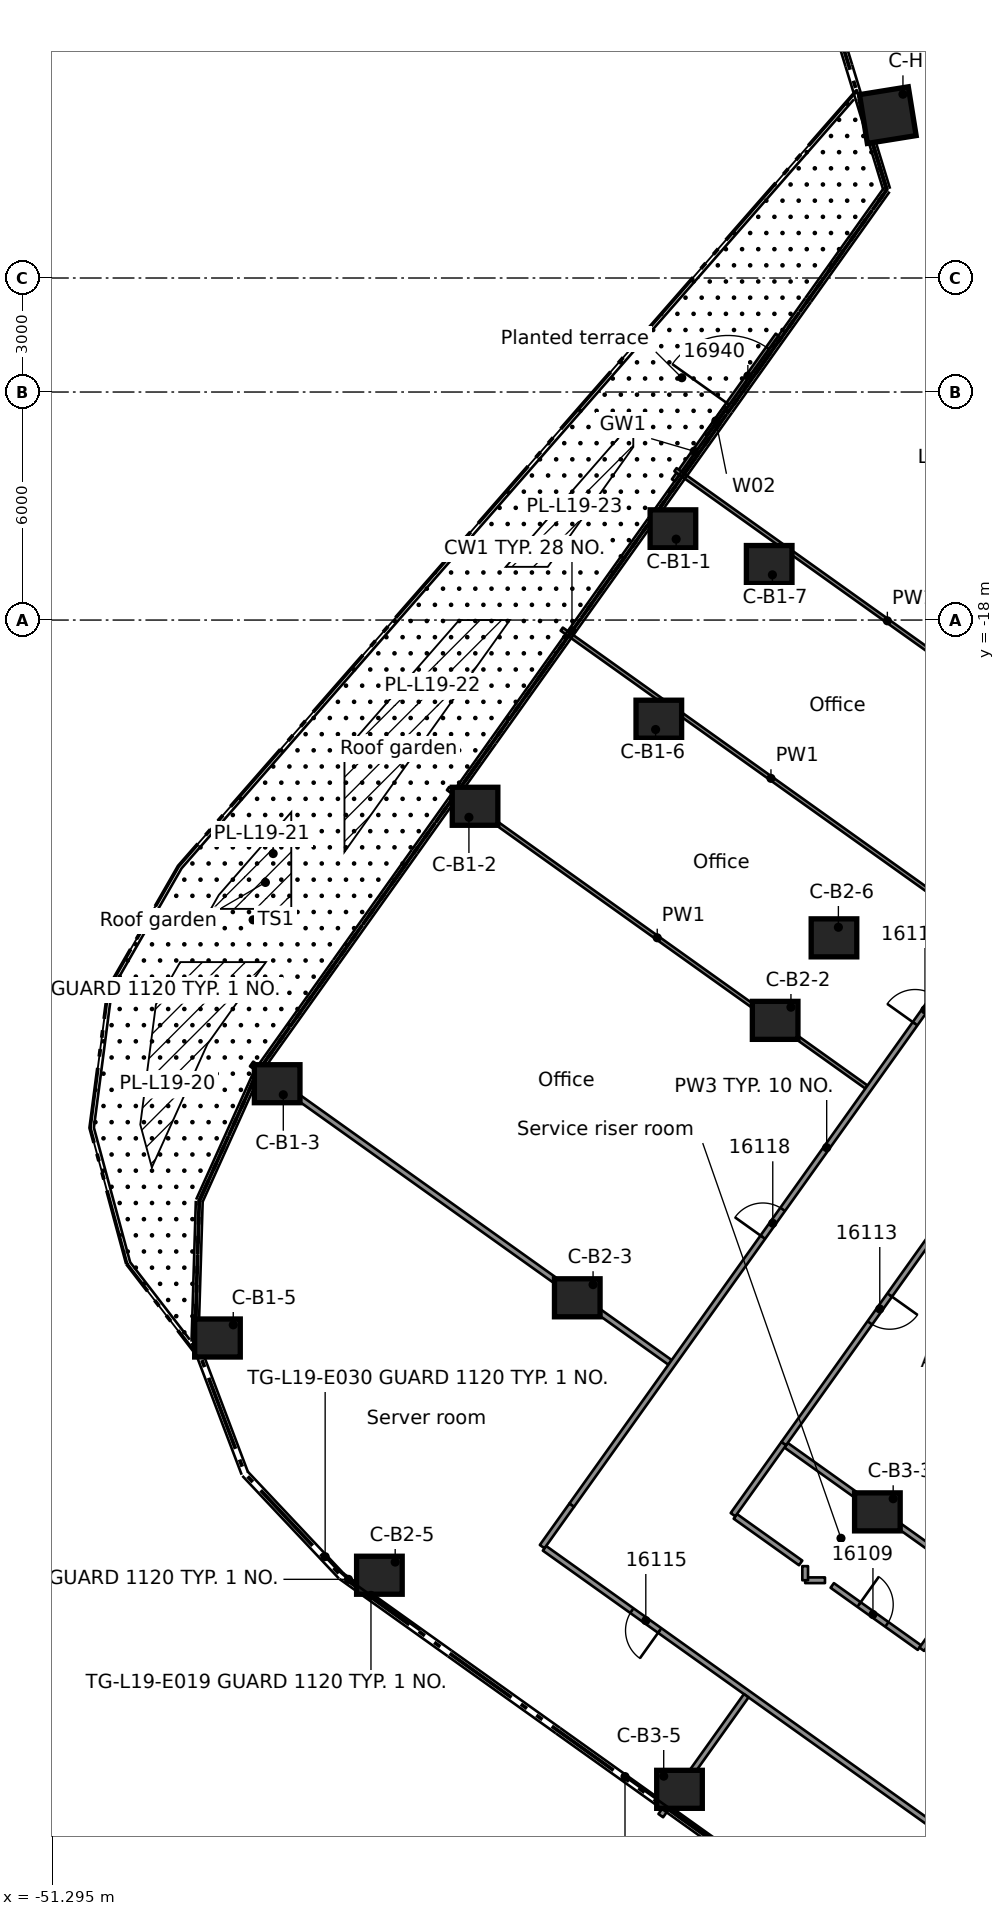
"""IFC4 building model, lengths in metres.
Left out: names, types, materials, properties, quantities, classifications, styles, units other than length and angle.
Written with IfcOpenShell. Run it as: python <this file> out.ifc"""

import sys

from ifc_helpers import new_model, si_unit, direction, frame, frame_2d, origin, origin_2d, place, context, subcontext, project, spatial, rectangle, extrude, element, fill, save


model = new_model("IFC4")
c1 = context("Model", 3, precision=1e-05, world=origin(), true_north=direction((0.0, 1.0)))
c2 = subcontext(c1, "Body", "Model", "MODEL_VIEW")
j1 = project(units=[si_unit("LENGTHUNIT", "METRE"), si_unit("PLANEANGLEUNIT", "RADIAN")], contexts=[c1])
p1 = place(None, origin())
s1 = spatial("IfcSite", under=j1, at=p1, CompositionType="ELEMENT")
p2 = place(p1, origin())
s2 = spatial("IfcBuilding", under=s1, at=p2, CompositionType="ELEMENT")
p3 = place(p2, frame((0.0, 0.0, 80.7)))
s3 = spatial("IfcBuildingStorey", under=s2, at=p3, CompositionType="ELEMENT", Elevation=80.7)
for number, where, z_axis, x_axis in (
    (1, (-34.957, -15.6, 0.0), (0.0, 0.0, 1.0), (1.0, 0.0, 0.0)),
    (2, (-40.164, -22.9, 0.0), (0.0, 0.0, 1.0), (1.0, 0.0, 0.0)),
    (3, (-45.371, -30.2, 0.0), (0.0, 0.0, 1.0), (1.0, 0.0, 0.0)),
    (4, (-46.942, -36.891, 0.0), (0.0, 0.0, 1.0), (1.0, 0.0, 0.0)),
    (5, (-35.328, -20.609, 0.0), (0.0, 0.0, 1.0), (1.0, 0.0, 0.0)),
    (6, (-32.424, -16.539, 0.0), (0.0, 0.0, 1.0), (1.0, 0.0, 0.0)),
    (7, (-32.267, -28.533, 0.0), (0.0, 0.0, 1.0), (1.0, 0.0, 0.0)),
    (8, (-37.474, -35.833, 0.0), (0.0, 0.0, 1.0), (1.0, 0.0, 0.0)),
    (9, (-42.681, -43.133, 0.0), (0.0, 0.0, 1.0), (1.0, 0.0, 0.0)),
    (10, (-30.719, -26.362, 0.0), (0.0, 0.0, 1.0), (1.0, 0.0, 0.0)),
    (11, (-29.577, -41.466, 0.0), (0.0, 0.0, 1.0), (1.0, 0.0, 0.0)),
    (12, (-34.784, -48.766, 0.0), (0.0, 0.0, 1.0), (1.0, 0.0, 0.0)),
):
    element("IfcColumn", number, at=place(p3, frame(where, z_axis=z_axis, x_axis=x_axis)), inside=s3, PredefinedType="COLUMN", context=c2, shape_type="SweptSolid", body=[
        extrude(rectangle(XDim=1.2, YDim=1.0, at=origin_2d()), origin(), (0.0, 0.0, 1.0), 3.5),
    ])
p4 = place(p3, frame((-29.302, -4.714, 0.0), z_axis=(0.0, 0.0, 1.0), x_axis=(-0.987305923232, -0.158830141822, 0.0)))
e13 = element("IfcColumn", 13, at=p4, inside=s3, PredefinedType="COLUMN", context=c2, shape_type="SweptSolid", body=[
    extrude(rectangle(XDim=1.3, YDim=1.3, at=origin_2d()), origin(), (0.0, 0.0, 1.0), 3.5),
])
p5 = place(p3, frame((-34.943, -14.324, 0.0), z_axis=(0.0, 0.0, 1.0), x_axis=(0.580693274378, 0.814122423897, 0.0)))
e14 = element("IfcWall", 14, at=p5, inside=s3, PredefinedType="STANDARD", context=c2, shape_type="SweptSolid", body=[
    extrude(rectangle(XDim=4.706, YDim=0.1, at=frame_2d((2.353, 0.0))), origin(), (0.0, 0.0, 1.0), 3.1),
])
p6 = place(p5, frame((2.472, 0.0, 0.0)))
e15 = element("IfcOpeningElement", 15, at=p6, cuts=e14, PredefinedType="OPENING", context=c2, shape_type="SweptSolid", body=[
    extrude(rectangle(XDim=1.8, YDim=2.4, at=frame_2d((0.9, 1.2))), frame((0.0, 0.06, 0.0), z_axis=(0.0, -1.0, 0.0), x_axis=(1.0, 0.0, 0.0)), (0.0, 0.0, 1.0), 0.12),
])
p7 = place(p5, frame((1.472, 0.0, 0.0)))
e16 = element("IfcOpeningElement", 16, at=p7, cuts=e14, PredefinedType="OPENING", context=c2, shape_type="SweptSolid", body=[
    extrude(rectangle(XDim=0.9, YDim=2.4, at=frame_2d((0.45, 1.2))), frame((0.0, 0.06, 0.0), z_axis=(0.0, -1.0, 0.0), x_axis=(1.0, 0.0, 0.0)), (0.0, 0.0, 1.0), 0.12),
])
p8 = place(p3, frame((-27.621, -50.068, 0.0), z_axis=(0.0, 0.0, 1.0), x_axis=(-0.814096747286, 0.580729270881, 0.0)))
e17 = element("IfcWall", 17, at=p8, inside=s3, PredefinedType="PARTITIONING", context=c2, shape_type="SweptSolid", body=[
    extrude(rectangle(XDim=13.163, YDim=0.15, at=frame_2d((6.582, 0.0))), origin(), (0.0, 0.0, 1.0), 3.08),
])
p9 = place(p8, frame((9.438, 0.0, 0.0)))
e18 = element("IfcOpeningElement", 18, at=p9, cuts=e17, PredefinedType="OPENING", context=c2, shape_type="SweptSolid", body=[
    extrude(rectangle(XDim=0.9, YDim=2.1, at=frame_2d((0.45, 1.05))), frame((0.0, 0.085, 0.0), z_axis=(0.0, -1.0, 0.0), x_axis=(1.0, 0.0, 0.0)), (0.0, 0.0, 1.0), 0.17),
])
p10 = place(p3, frame((-33.315, -41.584, 0.0), z_axis=(0.0, 0.0, 1.0), x_axis=(0.814350377658, -0.580373554195, 0.0)))
e19 = element("IfcWall", 19, at=p10, inside=s3, PredefinedType="PARTITIONING", context=c2, shape_type="SweptSolid", body=[
    extrude(rectangle(XDim=2.111, YDim=0.15, at=frame_2d((1.055, 0.0))), origin(), (0.0, 0.0, 1.0), 3.08),
])
p11 = place(p3, frame((-30.765, -43.402, 0.0), z_axis=(0.0, 0.0, 1.0), x_axis=(0.814324494631, -0.580409870216, 0.0)))
e20 = element("IfcWall", 20, at=p11, inside=s3, PredefinedType="PARTITIONING", context=c2, shape_type="SweptSolid", body=[
    extrude(rectangle(XDim=2.817, YDim=0.15, at=frame_2d((1.408, 0.0))), origin(), (0.0, 0.0, 1.0), 3.08),
])
p12 = place(p11, frame((0.865, 0.0, 0.0)))
e21 = element("IfcOpeningElement", 21, at=p12, cuts=e20, PredefinedType="OPENING", context=c2, shape_type="SweptSolid", body=[
    extrude(rectangle(XDim=0.9, YDim=2.1, at=frame_2d((0.45, 1.05))), frame((0.0, 0.085, 0.0), z_axis=(0.0, -1.0, 0.0), x_axis=(1.0, 0.0, 0.0)), (0.0, 0.0, 1.0), 0.17),
])
p13 = place(p3, frame((-46.044, -29.68, 0.0), z_axis=(0.0, 0.0, 1.0), x_axis=(0.814185756817, -0.580604472423, 0.0)))
e22 = element("IfcWall", 22, at=p13, inside=s3, PredefinedType="PARTITIONING", context=c2, shape_type="SweptSolid", body=[
    extrude(rectangle(XDim=13.524, YDim=0.15, at=frame_2d((6.762, 0.0))), origin(), (0.0, 0.0, 1.0), 3.08),
])
p14 = place(p3, frame((-31.979, -39.712, 0.0), z_axis=(0.0, 0.0, 1.0), x_axis=(0.814224065699, -0.580550747857, 0.0)))
e23 = element("IfcWall", 23, at=p14, inside=s3, PredefinedType="PARTITIONING", context=c2, shape_type="SweptSolid", body=[
    extrude(rectangle(XDim=5.948, YDim=0.15, at=frame_2d((2.974, 0.0))), origin(), (0.0, 0.0, 1.0), 3.08),
])
p15 = place(p3, frame((-40.875, -22.433, 0.0), z_axis=(0.0, 0.0, 1.0), x_axis=(0.814093136476, -0.58073433267, 0.0)))
e24 = element("IfcWall", 24, at=p15, inside=s3, PredefinedType="PARTITIONING", context=c2, shape_type="SweptSolid", body=[
    extrude(rectangle(XDim=13.524, YDim=0.1, at=frame_2d((6.762, 0.0))), origin(), (0.0, 0.0, 1.0), 3.08),
])
p16 = place(p3, frame((-37.883, -18.239, 0.0), z_axis=(0.0, 0.0, 1.0), x_axis=(0.814185756817, -0.580604472423, 0.0)))
e25 = element("IfcWall", 25, at=p16, inside=s3, PredefinedType="PARTITIONING", context=c2, shape_type="SweptSolid", body=[
    extrude(rectangle(XDim=13.524, YDim=0.1, at=frame_2d((6.762, 0.0))), origin(), (0.0, 0.0, 1.0), 3.08),
])
p17 = place(p3, frame((-34.89, -14.043, 0.0), z_axis=(0.0, 0.0, 1.0), x_axis=(0.814106649966, -0.580715388534, 0.0)))
e26 = element("IfcWall", 26, at=p17, inside=s3, PredefinedType="PARTITIONING", context=c2, shape_type="SweptSolid", body=[
    extrude(rectangle(XDim=13.697, YDim=0.1, at=frame_2d((6.849, 0.0))), origin(), (0.0, 0.0, 1.0), 3.08),
])
p18 = place(p3, frame((-31.477, -43.265, 0.0), z_axis=(0.0, 0.0, 1.0), x_axis=(1.0, 0.0, 0.0)))
e27 = element("IfcWall", 27, at=p18, inside=s3, PredefinedType="PARTITIONING", context=c2, shape_type="SweptSolid", body=[
    extrude(rectangle(XDim=0.521, YDim=0.15, at=frame_2d((0.26, 0.0))), origin(), (0.0, 0.0, 1.0), 3.08),
])
p19 = place(p3, frame((-28.41, -45.081, 0.0), z_axis=(0.0, 0.0, 1.0), x_axis=(0.580610007884, 0.814181809392, 0.0)))
e28 = element("IfcWall", 28, at=p19, inside=s3, PredefinedType="PARTITIONING", context=c2, shape_type="SweptSolid", body=[
    extrude(rectangle(XDim=21.035, YDim=0.15, at=frame_2d((10.517, 0.0))), origin(), (0.0, 0.0, 1.0), 3.08),
])
p20 = place(p3, frame((-35.277, -49.458, 0.0), z_axis=(0.0, 0.0, 1.0), x_axis=(0.580457100941, 0.814290828861, 0.0)))
e29 = element("IfcWall", 29, at=p20, inside=s3, PredefinedType="PARTITIONING", context=c2, shape_type="SweptSolid", body=[
    extrude(rectangle(XDim=3.875, YDim=0.15, at=frame_2d((1.937, 0.0))), origin(), (0.0, 0.0, 1.0), 3.08),
])
p21 = place(p3, frame((-33.376, -41.54, 0.0), z_axis=(0.0, 0.0, 1.0), x_axis=(0.580876637745, 0.813991604209, 0.0)))
e30 = element("IfcWall", 30, at=p21, inside=s3, PredefinedType="PARTITIONING", context=c2, shape_type="SweptSolid", body=[
    extrude(rectangle(XDim=2.3, YDim=0.15, at=frame_2d((1.15, 0.0))), origin(), (0.0, 0.0, 1.0), 3.08),
])
p22 = place(p3, frame((-20.992, -24.178, 0.0), z_axis=(0.0, 0.0, 1.0), x_axis=(-0.580674845043, -0.814135568768, 0.0)))
e31 = element("IfcWall", 31, at=p22, inside=s3, PredefinedType="PARTITIONING", context=c2, shape_type="SweptSolid", body=[
    extrude(rectangle(XDim=19.026, YDim=0.15, at=frame_2d((9.513, 0.0))), origin(), (0.0, 0.0, 1.0), 3.08),
])
p23 = place(p22, frame((4.6, 0.0, 0.0)))
e32 = element("IfcOpeningElement", 32, at=p23, cuts=e31, PredefinedType="OPENING", context=c2, shape_type="SweptSolid", body=[
    extrude(rectangle(XDim=0.9, YDim=2.1, at=frame_2d((0.45, 1.05))), frame((0.0, 0.085, 0.0), z_axis=(0.0, -1.0, 0.0), x_axis=(1.0, 0.0, 0.0)), (0.0, 0.0, 1.0), 0.17),
])
p24 = place(p22, frame((14.226, 0.0, 0.0)))
e33 = element("IfcOpeningElement", 33, at=p24, cuts=e31, PredefinedType="OPENING", context=c2, shape_type="SweptSolid", body=[
    extrude(rectangle(XDim=0.9, YDim=2.1, at=frame_2d((0.45, 1.05))), frame((0.0, 0.085, 0.0), z_axis=(0.0, -1.0, 0.0), x_axis=(1.0, 0.0, 0.0)), (0.0, 0.0, 1.0), 0.17),
])
p25 = place(p3, frame((-37.621, -41.29, 0.0), z_axis=(0.0, 0.0, 1.0), x_axis=(0.580691447967, 0.814123726628, 0.0)))
e34 = element("IfcWall", 34, at=p25, inside=s3, PredefinedType="PARTITIONING", context=c2, shape_type="SweptSolid", body=[
    extrude(rectangle(XDim=23.111, YDim=0.15, at=frame_2d((11.555, 0.0))), origin(), (0.0, 0.0, 1.0), 3.08),
])
p26 = place(p25, frame((20.465, 0.0, 0.0)))
e35 = element("IfcOpeningElement", 35, at=p26, cuts=e34, PredefinedType="OPENING", context=c2, shape_type="SweptSolid", body=[
    extrude(rectangle(XDim=0.9, YDim=2.1, at=frame_2d((0.45, 1.05))), frame((0.0, 0.085, 0.0), z_axis=(0.0, -1.0, 0.0), x_axis=(1.0, 0.0, 0.0)), (0.0, 0.0, 1.0), 0.17),
])
p27 = place(p25, frame((15.561, 0.0, 0.0)))
e36 = element("IfcOpeningElement", 36, at=p27, cuts=e34, PredefinedType="OPENING", context=c2, shape_type="SweptSolid", body=[
    extrude(rectangle(XDim=0.9, YDim=2.1, at=frame_2d((0.45, 1.05))), frame((0.0, 0.085, 0.0), z_axis=(0.0, -1.0, 0.0), x_axis=(1.0, 0.0, 0.0)), (0.0, 0.0, 1.0), 0.17),
])
p28 = place(p25, frame((8.662, 0.0, 0.0)))
e37 = element("IfcOpeningElement", 37, at=p28, cuts=e34, PredefinedType="OPENING", context=c2, shape_type="SweptSolid", body=[
    extrude(rectangle(XDim=0.9, YDim=2.1, at=frame_2d((0.45, 1.05))), frame((0.0, 0.085, 0.0), z_axis=(0.0, -1.0, 0.0), x_axis=(1.0, 0.0, 0.0)), (0.0, 0.0, 1.0), 0.17),
])
p29 = place(p3, frame((-38.398, -42.38, 0.0), z_axis=(0.0, 0.0, 1.0), x_axis=(0.580444165939, 0.814300049262, 0.0)))
e38 = element("IfcWall", 38, at=p29, inside=s3, PredefinedType="PARTITIONING", context=c2, shape_type="SweptSolid", body=[
    extrude(rectangle(XDim=1.338, YDim=0.15, at=frame_2d((0.669, 0.0))), origin(), (0.0, 0.0, 1.0), 3.08),
])
p30 = place(p3, frame((-31.477, -43.265, 0.0), z_axis=(0.0, 0.0, 1.0), x_axis=(0.0, 1.0, 0.0)))
e39 = element("IfcWall", 39, at=p30, inside=s3, PredefinedType="PARTITIONING", context=c2, shape_type="SweptSolid", body=[
    extrude(rectangle(XDim=0.371, YDim=0.15, at=frame_2d((0.186, 0.0))), origin(), (0.0, 0.0, 1.0), 3.08),
])
p31 = place(p6, origin())
e40 = element("IfcDoor", 40, at=p31, inside=s3, OperationType="DOUBLE_DOOR_SINGLE_SWING", PredefinedType="DOOR", context=c2, shape_type="SweptSolid", body=[
    extrude(rectangle(XDim=1.8, YDim=2.4, at=frame_2d((0.9, 1.2))), frame((0.0, 0.025, 0.0), z_axis=(0.0, -1.0, 0.0), x_axis=(1.0, 0.0, 0.0)), (0.0, 0.0, 1.0), 0.05),
])
fill(e15, e40)
p32 = place(p7, origin())
e41 = element("IfcWindow", 41, at=p32, inside=s3, PartitioningType="SINGLE_PANEL", PredefinedType="WINDOW", context=c2, shape_type="SweptSolid", body=[
    extrude(rectangle(XDim=0.9, YDim=2.4, at=frame_2d((0.45, 1.2))), frame((0.0, 0.03, 0.0), z_axis=(0.0, -1.0, 0.0), x_axis=(1.0, 0.0, 0.0)), (0.0, 0.0, 1.0), 0.06),
])
fill(e16, e41)
p33 = place(p12, origin())
e42 = element("IfcDoor", 42, at=p33, inside=s3, OperationType="SINGLE_SWING_LEFT", PredefinedType="DOOR", context=c2, shape_type="SweptSolid", body=[
    extrude(rectangle(XDim=0.9, YDim=2.1, at=frame_2d((0.45, 1.05))), frame((0.0, 0.025, 0.0), z_axis=(0.0, -1.0, 0.0), x_axis=(1.0, 0.0, 0.0)), (0.0, 0.0, 1.0), 0.05),
])
fill(e21, e42)
p34 = place(p24, origin())
e43 = element("IfcDoor", 43, at=p34, inside=s3, OperationType="SINGLE_SWING_RIGHT", PredefinedType="DOOR", context=c2, shape_type="SweptSolid", body=[
    extrude(rectangle(XDim=0.9, YDim=2.1, at=frame_2d((0.45, 1.05))), frame((0.0, 0.025, 0.0), z_axis=(0.0, -1.0, 0.0), x_axis=(1.0, 0.0, 0.0)), (0.0, 0.0, 1.0), 0.05),
])
fill(e33, e43)
p35 = place(p9, origin())
e44 = element("IfcDoor", 44, at=p35, inside=s3, OperationType="SINGLE_SWING_RIGHT", PredefinedType="DOOR", context=c2, shape_type="SweptSolid", body=[
    extrude(rectangle(XDim=0.9, YDim=2.1, at=frame_2d((0.45, 1.05))), frame((0.0, 0.025, 0.0), z_axis=(0.0, -1.0, 0.0), x_axis=(1.0, 0.0, 0.0)), (0.0, 0.0, 1.0), 0.05),
])
fill(e18, e44)
p36 = place(p27, origin())
e45 = element("IfcDoor", 45, at=p36, inside=s3, OperationType="SINGLE_SWING_RIGHT", PredefinedType="DOOR", context=c2, shape_type="SweptSolid", body=[
    extrude(rectangle(XDim=0.9, YDim=2.1, at=frame_2d((0.45, 1.05))), frame((0.0, 0.025, 0.0), z_axis=(0.0, -1.0, 0.0), x_axis=(1.0, 0.0, 0.0)), (0.0, 0.0, 1.0), 0.05),
])
fill(e36, e45)
p37 = place(p28, origin())
e46 = element("IfcDoor", 46, at=p37, inside=s3, OperationType="SINGLE_SWING_LEFT", PredefinedType="DOOR", context=c2, shape_type="SweptSolid", body=[
    extrude(rectangle(XDim=0.9, YDim=2.1, at=frame_2d((0.45, 1.05))), frame((0.0, 0.025, 0.0), z_axis=(0.0, -1.0, 0.0), x_axis=(1.0, 0.0, 0.0)), (0.0, 0.0, 1.0), 0.05),
])
fill(e37, e46)
save(model, sys.argv[1])
